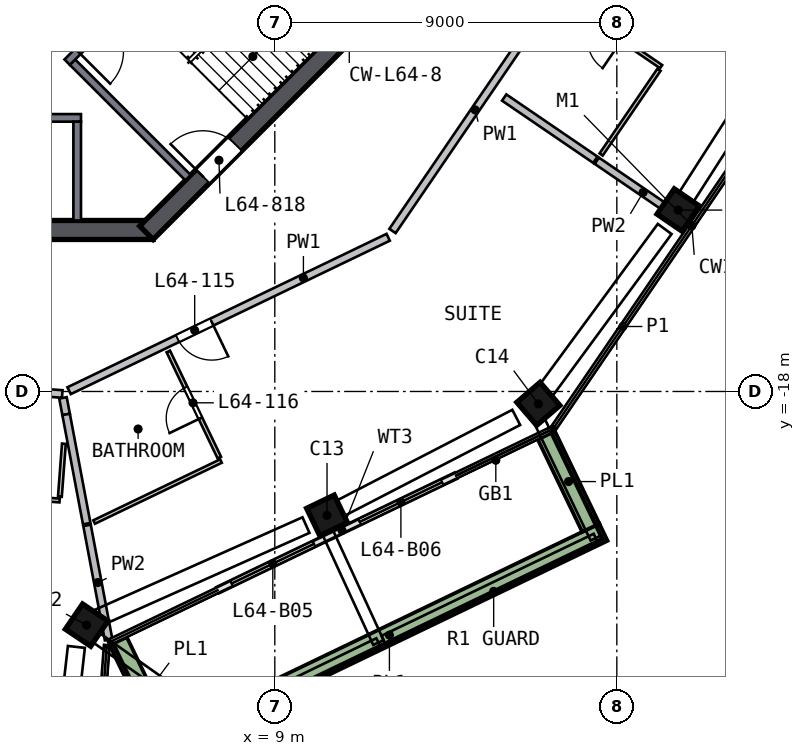
"""IFC4 building model, lengths in metres.
Left out: names, types, materials, properties, quantities, classifications, styles, units other than length and angle.
Written with IfcOpenShell. Run it as: python <this file> out.ifc"""

import sys

from ifc_helpers import new_model, si_unit, direction, frame, frame_2d, origin, origin_2d, place, context, subcontext, project, spatial, rectangle, extrude, element, fill, save


model = new_model("IFC4")
c1 = context("Model", 3, precision=1e-05, world=origin(), true_north=direction((0.0, 1.0)))
c2 = subcontext(c1, "Body", "Model", "MODEL_VIEW")
j1 = project(units=[si_unit("LENGTHUNIT", "METRE"), si_unit("PLANEANGLEUNIT", "RADIAN")], contexts=[c1])
p1 = place(None, origin())
s1 = spatial("IfcSite", under=j1, at=p1, CompositionType="ELEMENT")
p2 = place(p1, origin())
s2 = spatial("IfcBuilding", under=s1, at=p2, CompositionType="ELEMENT")
p3 = place(p2, frame((0.0, 0.0, 259.5)))
s3 = spatial("IfcBuildingStorey", under=s2, at=p3, CompositionType="ELEMENT", Elevation=259.5)
p4 = place(p3, frame((3.91, -24.171, 0.0), z_axis=(0.114774159, 0.019479276, 0.993200609), x_axis=(-0.55689455, -0.826666373, 0.080567778)))
e1 = element("IfcColumn", 1, at=p4, inside=s3, PredefinedType="COLUMN", context=c2, shape_type="SweptSolid", body=[
    extrude(rectangle(XDim=0.8, YDim=0.8, at=origin_2d()), origin(), (0.0, 0.0, 1.0), 3.021),
])
p5 = place(p3, frame((10.252, -21.322, 0.0), z_axis=(0.100998536, 0.049569338, 0.993650933), x_axis=(0.895692503, 0.430206945, -0.112502994)))
e2 = element("IfcColumn", 2, at=p5, inside=s3, PredefinedType="COLUMN", context=c2, shape_type="SweptSolid", body=[
    extrude(rectangle(XDim=0.8, YDim=0.8, at=origin_2d()), origin(), (0.0, 0.0, 1.0), 3.019),
])
p6 = place(p3, frame((15.83, -18.417, 0.0), z_axis=(0.086979121, 0.075985477, 0.993308029), x_axis=(-0.75357881, -0.647132727, 0.115491175)))
e3 = element("IfcColumn", 3, at=p6, inside=s3, PredefinedType="COLUMN", context=c2, shape_type="SweptSolid", body=[
    extrude(rectangle(XDim=0.8, YDim=0.8, at=origin_2d()), origin(), (0.0, 0.0, 1.0), 3.02),
])
p7 = place(p3, frame((19.54, -13.339, 0.0), z_axis=(0.062668984, 0.093477865, 0.993647064), x_axis=(0.560299936, 0.820609145, -0.11253716)))
e4 = element("IfcColumn", 4, at=p7, inside=s3, PredefinedType="COLUMN", context=c2, shape_type="SweptSolid", body=[
    extrude(rectangle(XDim=0.8, YDim=0.8, at=origin_2d()), origin(), (0.0, 0.0, 1.0), 3.019),
])
p8 = place(p3, frame((-5.799, -13.75, 0.0), z_axis=(0.0, 0.0, 1.0), x_axis=(1.0, 0.0, 0.0)))
e5 = element("IfcWall", 5, at=p8, inside=s3, PredefinedType="SHEAR", context=c2, shape_type="SweptSolid", body=[
    extrude(rectangle(XDim=11.598, YDim=0.5, at=frame_2d((5.799, 0.0))), origin(), (0.0, 0.0, 1.0), 3.5),
])
p9 = place(p3, frame((5.622, -13.823, 0.0), z_axis=(0.0, 0.0, 1.0), x_axis=(0.707106781, 0.707106781, 0.0)))
e6 = element("IfcWall", 6, at=p9, inside=s3, PredefinedType="SHEAR", context=c2, shape_type="SweptSolid", body=[
    extrude(rectangle(XDim=11.598, YDim=0.5, at=frame_2d((5.799, 0.0))), origin(), (0.0, 0.0, 1.0), 3.5),
])
p10 = place(p9, frame((2.099, 0.0, 0.0)))
e7 = element("IfcOpeningElement", 7, at=p10, cuts=e6, PredefinedType="OPENING", context=c2, shape_type="SweptSolid", body=[
    extrude(rectangle(XDim=1.2, YDim=2.1, at=frame_2d((0.6, 1.05))), frame((0.0, 0.26, 0.0), z_axis=(0.0, -1.0, 0.0), x_axis=(1.0, 0.0, 0.0)), (0.0, 0.0, 1.0), 0.52),
])
p11 = place(p3, frame((7.506, -23.225, 0.0), z_axis=(0.0, 0.0, 1.0), x_axis=(0.901215754, 0.433370702, 0.0)))
e8 = element("IfcWall", 8, at=p11, inside=s3, PredefinedType="SOLIDWALL", context=c2, shape_type="SweptSolid", body=[
    extrude(rectangle(XDim=3.3, YDim=0.15, at=frame_2d((1.65, 0.0))), origin(), (0.0, 0.0, 1.0), 2.935),
])
p12 = place(p11, frame((0.4, 0.0, 0.0)))
e9 = element("IfcOpeningElement", 9, at=p12, cuts=e8, PredefinedType="OPENING", context=c2, shape_type="SweptSolid", body=[
    extrude(rectangle(XDim=2.4, YDim=2.4, at=frame_2d((1.2, 1.2))), frame((0.0, 0.085, 0.0), z_axis=(0.0, -1.0, 0.0), x_axis=(1.0, 0.0, 0.0)), (0.0, 0.0, 1.0), 0.17),
])
p13 = place(p3, frame((10.48, -21.795, 0.0), z_axis=(0.0, 0.0, 1.0), x_axis=(0.90124235, 0.43331539, 0.0)))
e10 = element("IfcWall", 10, at=p13, inside=s3, PredefinedType="SOLIDWALL", context=c2, shape_type="SweptSolid", body=[
    extrude(rectangle(XDim=3.64, YDim=0.15, at=frame_2d((1.82, 0.0))), origin(), (0.0, 0.0, 1.0), 2.935),
])
p14 = place(p13, frame((0.84, 0.0, 0.0)))
e11 = element("IfcOpeningElement", 11, at=p14, cuts=e10, PredefinedType="OPENING", context=c2, shape_type="SweptSolid", body=[
    extrude(rectangle(XDim=2.4, YDim=2.4, at=frame_2d((1.2, 1.2))), frame((0.0, 0.085, 0.0), z_axis=(0.0, -1.0, 0.0), x_axis=(1.0, 0.0, 0.0)), (0.0, 0.0, 1.0), 0.17),
])
p15 = place(p3, frame((4.88, -24.572, 0.0), z_axis=(0.0, 0.0, 1.0), x_axis=(0.433393374, -0.901204851, 0.0)))
e12 = element("IfcWall", 12, at=p15, inside=s3, PredefinedType="SOLIDWALL", context=c2, shape_type="SweptSolid", body=[
    extrude(rectangle(XDim=3.199, YDim=0.5, at=frame_2d((1.6, 0.0))), origin(), (0.0, 0.0, 1.0), 0.7),
])
p16 = place(p3, frame((6.383, -27.121, 0.0), z_axis=(0.0, 0.0, 1.0), x_axis=(0.901222941, 0.433355755, 0.0)))
e13 = element("IfcWall", 13, at=p16, inside=s3, PredefinedType="SOLIDWALL", context=c2, shape_type="SweptSolid", body=[
    extrude(rectangle(XDim=12.5, YDim=0.5, at=frame_2d((6.25, 0.0))), origin(), (0.0, 0.0, 1.0), 0.7),
])
p17 = place(p3, frame((17.315, -21.587, 0.0), z_axis=(0.0, 0.0, 1.0), x_axis=(-0.433374971, 0.901213701, 0.0)))
e14 = element("IfcWall", 14, at=p17, inside=s3, PredefinedType="SOLIDWALL", context=c2, shape_type="SweptSolid", body=[
    extrude(rectangle(XDim=2.699, YDim=0.5, at=frame_2d((1.35, 0.0))), origin(), (0.0, 0.0, 1.0), 0.7),
])
p18 = place(p3, frame((-3.9, -10.8, 0.0), z_axis=(0.0, 0.0, 1.0), x_axis=(1.0, 0.0, 0.0)))
e15 = element("IfcWall", 15, at=p18, inside=s3, PredefinedType="SOLIDWALL", context=c2, shape_type="SweptSolid", body=[
    extrude(rectangle(XDim=7.8, YDim=0.2, at=frame_2d((3.9, 0.0))), origin(), (0.0, 0.0, 1.0), 3.0),
])
p19 = place(p18, frame((3.45, 0.0, 0.0)))
e16 = element("IfcOpeningElement", 16, at=p19, cuts=e15, PredefinedType="OPENING", context=c2, shape_type="SweptSolid", body=[
    extrude(rectangle(XDim=0.9, YDim=2.1, at=frame_2d((0.45, 1.05))), frame((0.0, 0.11, 0.0), z_axis=(0.0, -1.0, 0.0), x_axis=(1.0, 0.0, 0.0)), (0.0, 0.0, 1.0), 0.22),
])
p20 = place(p3, frame((3.8, -10.9, 0.0), z_axis=(0.0, 0.0, 1.0), x_axis=(0.0, -1.0, 0.0)))
e17 = element("IfcWall", 17, at=p20, inside=s3, PredefinedType="SOLIDWALL", context=c2, shape_type="SweptSolid", body=[
    extrude(rectangle(XDim=2.6, YDim=0.2, at=frame_2d((1.3, 0.0))), origin(), (0.0, 0.0, 1.0), 3.0),
])
p21 = place(p3, frame((9.629, -3.24, 0.0), z_axis=(0.0, 0.0, 1.0), x_axis=(-0.707120946, -0.707092617, 0.0)))
e18 = element("IfcWall", 18, at=p21, inside=s3, PredefinedType="SOLIDWALL", context=c2, shape_type="SweptSolid", body=[
    extrude(rectangle(XDim=8.618, YDim=0.2, at=frame_2d((4.309, 0.0))), origin(), (0.0, 0.0, 1.0), 3.0),
])
p22 = place(p21, frame((7.018, 0.0, 0.0)))
e19 = element("IfcOpeningElement", 19, at=p22, cuts=e18, PredefinedType="OPENING", context=c2, shape_type="SweptSolid", body=[
    extrude(rectangle(XDim=1.2, YDim=2.1, at=frame_2d((0.6, 1.05))), frame((0.0, 0.11, 0.0), z_axis=(0.0, -1.0, 0.0), x_axis=(1.0, 0.0, 0.0)), (0.0, 0.0, 1.0), 0.22),
])
p23 = place(p3, frame((3.677, -9.334, 0.0), z_axis=(0.0, 0.0, 1.0), x_axis=(0.707078393, -0.707135168, 0.0)))
e20 = element("IfcWall", 20, at=p23, inside=s3, PredefinedType="SOLIDWALL", context=c2, shape_type="SweptSolid", body=[
    extrude(rectangle(XDim=4.3, YDim=0.2, at=frame_2d((2.15, 0.0))), origin(), (0.0, 0.0, 1.0), 3.0),
])
p24 = place(p3, frame((-0.241, -17.791, 0.0), z_axis=(0.0, 0.0, 1.0), x_axis=(0.997157218, -0.075349073, 0.0)))
e21 = element("IfcWall", 21, at=p24, inside=s3, PredefinedType="SOLIDWALL", context=c2, shape_type="SweptSolid", body=[
    extrude(rectangle(XDim=3.658, YDim=0.2, at=frame_2d((1.829, 0.0))), origin(), (0.0, 0.0, 1.0), 3.0),
])
p25 = place(p3, frame((11.983, -13.942, 0.0), z_axis=(0.0, 0.0, 1.0), x_axis=(-0.901228413, -0.433344375, 0.0)))
e22 = element("IfcWall", 22, at=p25, inside=s3, PredefinedType="SOLIDWALL", context=c2, shape_type="SweptSolid", body=[
    extrude(rectangle(XDim=9.316, YDim=0.2, at=frame_2d((4.658, 0.0))), origin(), (0.0, 0.0, 1.0), 3.0),
])
p26 = place(p25, frame((5.15, 0.0, 0.0)))
e23 = element("IfcOpeningElement", 23, at=p26, cuts=e22, PredefinedType="OPENING", context=c2, shape_type="SweptSolid", body=[
    extrude(rectangle(XDim=1.0, YDim=2.1, at=frame_2d((0.5, 1.05))), frame((0.0, 0.11, 0.0), z_axis=(0.0, -1.0, 0.0), x_axis=(1.0, 0.0, 0.0)), (0.0, 0.0, 1.0), 0.22),
])
p27 = place(p3, frame((17.236, -6.248, 0.0), z_axis=(0.0, 0.0, 1.0), x_axis=(-0.563807947, -0.825905926, 0.0)))
e24 = element("IfcWall", 24, at=p27, inside=s3, PredefinedType="SOLIDWALL", context=c2, shape_type="SweptSolid", body=[
    extrude(rectangle(XDim=9.115, YDim=0.2, at=frame_2d((4.558, 0.0))), origin(), (0.0, 0.0, 1.0), 3.0),
])
p28 = place(p27, frame((0.2, 0.0, 0.0)))
e25 = element("IfcOpeningElement", 25, at=p28, cuts=e24, PredefinedType="OPENING", context=c2, shape_type="SweptSolid", body=[
    extrude(rectangle(XDim=1.0, YDim=2.1, at=frame_2d((0.5, 1.05))), frame((0.0, 0.11, 0.0), z_axis=(0.0, -1.0, 0.0), x_axis=(1.0, 0.0, 0.0)), (0.0, 0.0, 1.0), 0.22),
])
p29 = place(p3, frame((3.426, -18.168, 0.0), z_axis=(0.0, 0.0, 1.0), x_axis=(0.185317689, -0.982678663, 0.0)))
e26 = element("IfcWall", 26, at=p29, inside=s3, PredefinedType="SOLIDWALL", context=c2, shape_type="SweptSolid", body=[
    extrude(rectangle(XDim=0.444, YDim=0.2, at=frame_2d((0.222, 0.0))), origin(), (0.0, 0.0, 1.0), 3.0),
])
p30 = place(p3, frame((3.509, -18.604, 0.0), z_axis=(0.0, 0.0, 1.0), x_axis=(0.185331809, -0.982676, 0.0)))
e27 = element("IfcWall", 27, at=p30, inside=s3, PredefinedType="SOLIDWALL", context=c2, shape_type="SweptSolid", body=[
    extrude(rectangle(XDim=2.925, YDim=0.2, at=frame_2d((1.462, 0.0))), origin(), (0.0, 0.0, 1.0), 3.0),
])
p31 = place(p3, frame((4.059, -21.523, 0.0), z_axis=(0.0, 0.0, 1.0), x_axis=(0.185338116, -0.98267481, 0.0)))
e28 = element("IfcWall", 28, at=p31, inside=s3, PredefinedType="SOLIDWALL", context=c2, shape_type="SweptSolid", body=[
    extrude(rectangle(XDim=3.061, YDim=0.2, at=frame_2d((1.531, 0.0))), origin(), (0.0, 0.0, 1.0), 3.0),
])
p32 = place(p3, frame((15.036, -10.265, 0.0), z_axis=(0.0, 0.0, 1.0), x_axis=(0.825923162, -0.563782698, 0.0)))
e29 = element("IfcWall", 29, at=p32, inside=s3, PredefinedType="SOLIDWALL", context=c2, shape_type="SweptSolid", body=[
    extrude(rectangle(XDim=2.905, YDim=0.2, at=frame_2d((1.452, 0.0))), origin(), (0.0, 0.0, 1.0), 3.0),
])
p33 = place(p3, frame((17.473, -11.928, 0.0), z_axis=(0.0, 0.0, 1.0), x_axis=(0.825931536, -0.56377043, 0.0)))
e30 = element("IfcWall", 30, at=p33, inside=s3, PredefinedType="SOLIDWALL", context=c2, shape_type="SweptSolid", body=[
    extrude(rectangle(XDim=2.952, YDim=0.2, at=frame_2d((1.476, 0.0))), origin(), (0.0, 0.0, 1.0), 3.0),
])
p34 = place(p3, frame((-0.252, -20.598, 0.0), z_axis=(0.0, 0.0, 1.0), x_axis=(0.997162392, -0.075280572, 0.0)))
e31 = element("IfcWall", 31, at=p34, inside=s3, PredefinedType="PARTITIONING", context=c2, shape_type="SweptSolid", body=[
    extrude(rectangle(XDim=3.6, YDim=0.1, at=frame_2d((1.8, 0.0))), origin(), (0.0, 0.0, 1.0), 3.0),
])
p35 = place(p34, frame((1.2, 0.0, 0.0)))
e32 = element("IfcOpeningElement", 32, at=p35, cuts=e31, PredefinedType="OPENING", context=c2, shape_type="SweptSolid", body=[
    extrude(rectangle(XDim=1.0, YDim=2.1, at=frame_2d((0.5, 1.05))), frame((0.0, 0.06, 0.0), z_axis=(0.0, -1.0, 0.0), x_axis=(1.0, 0.0, 0.0)), (0.0, 0.0, 1.0), 0.12),
])
p36 = place(p3, frame((3.45, -19.375, 0.0), z_axis=(0.0, 0.0, 1.0), x_axis=(-0.075414876, -0.997152243, 0.0)))
e33 = element("IfcWall", 33, at=p36, inside=s3, PredefinedType="PARTITIONING", context=c2, shape_type="SweptSolid", body=[
    extrude(rectangle(XDim=1.398, YDim=0.1, at=frame_2d((0.699, 0.0))), origin(), (0.0, 0.0, 1.0), 3.0),
])
p37 = place(p3, frame((7.584, -19.83, 0.0), z_axis=(0.0, 0.0, 1.0), x_axis=(-0.901215297, -0.433371651, 0.0)))
e34 = element("IfcWall", 34, at=p37, inside=s3, PredefinedType="PARTITIONING", context=c2, shape_type="SweptSolid", body=[
    extrude(rectangle(XDim=3.704, YDim=0.1, at=frame_2d((1.852, 0.0))), origin(), (0.0, 0.0, 1.0), 3.0),
])
p38 = place(p3, frame((7.541, -19.74, 0.0), z_axis=(0.0, 0.0, 1.0), x_axis=(-0.433394078, 0.901204512, 0.0)))
e35 = element("IfcWall", 35, at=p38, inside=s3, PredefinedType="PARTITIONING", context=c2, shape_type="SweptSolid", body=[
    extrude(rectangle(XDim=3.1, YDim=0.1, at=frame_2d((1.55, 0.0))), origin(), (0.0, 0.0, 1.0), 3.0),
])
p39 = place(p38, frame((1.15, 0.0, 0.0)))
e36 = element("IfcOpeningElement", 36, at=p39, cuts=e35, PredefinedType="OPENING", context=c2, shape_type="SweptSolid", body=[
    extrude(rectangle(XDim=0.9, YDim=2.1, at=frame_2d((0.45, 1.05))), frame((0.0, 0.06, 0.0), z_axis=(0.0, -1.0, 0.0), x_axis=(1.0, 0.0, 0.0)), (0.0, 0.0, 1.0), 0.12),
])
p40 = place(p3, frame((19.166, -9.452, 0.0), z_axis=(0.0, 0.0, 1.0), x_axis=(-0.8258963, 0.563822047, 0.0)))
e37 = element("IfcWall", 37, at=p40, inside=s3, PredefinedType="PARTITIONING", context=c2, shape_type="SweptSolid", body=[
    extrude(rectangle(XDim=3.2, YDim=0.1, at=frame_2d((1.6, 0.0))), origin(), (0.0, 0.0, 1.0), 3.0),
])
p41 = place(p40, frame((1.25, 0.0, 0.0)))
e38 = element("IfcOpeningElement", 38, at=p41, cuts=e37, PredefinedType="OPENING", context=c2, shape_type="SweptSolid", body=[
    extrude(rectangle(XDim=0.9, YDim=2.1, at=frame_2d((0.45, 1.05))), frame((0.0, 0.06, 0.0), z_axis=(0.0, -1.0, 0.0), x_axis=(1.0, 0.0, 0.0)), (0.0, 0.0, 1.0), 0.12),
])
p42 = place(p3, frame((19.11, -9.534, 0.0), z_axis=(0.0, 0.0, 1.0), x_axis=(-0.563847343, -0.825879031, 0.0)))
e39 = element("IfcWall", 39, at=p42, inside=s3, PredefinedType="PARTITIONING", context=c2, shape_type="SweptSolid", body=[
    extrude(rectangle(XDim=2.7, YDim=0.1, at=frame_2d((1.35, 0.0))), origin(), (0.0, 0.0, 1.0), 3.0),
])
p43 = place(p12, origin())
e40 = element("IfcDoor", 40, at=p43, inside=s3, OperationType="SLIDING_TO_RIGHT", PredefinedType="DOOR", context=c2, shape_type="SweptSolid", body=[
    extrude(rectangle(XDim=2.4, YDim=2.4, at=frame_2d((1.2, 1.2))), frame((0.0, 0.025, 0.0), z_axis=(0.0, -1.0, 0.0), x_axis=(1.0, 0.0, 0.0)), (0.0, 0.0, 1.0), 0.05),
])
fill(e9, e40)
p44 = place(p14, origin())
e41 = element("IfcDoor", 41, at=p44, inside=s3, OperationType="SLIDING_TO_LEFT", PredefinedType="DOOR", context=c2, shape_type="SweptSolid", body=[
    extrude(rectangle(XDim=2.4, YDim=2.4, at=frame_2d((1.2, 1.2))), frame((0.0, 0.025, 0.0), z_axis=(0.0, -1.0, 0.0), x_axis=(1.0, 0.0, 0.0)), (0.0, 0.0, 1.0), 0.05),
])
fill(e11, e41)
p45 = place(p10, origin())
e42 = element("IfcDoor", 42, at=p45, inside=s3, OperationType="SINGLE_SWING_LEFT", PredefinedType="DOOR", context=c2, shape_type="SweptSolid", body=[
    extrude(rectangle(XDim=1.2, YDim=2.1, at=frame_2d((0.6, 1.05))), frame((0.0, 0.025, 0.0), z_axis=(0.0, -1.0, 0.0), x_axis=(1.0, 0.0, 0.0)), (0.0, 0.0, 1.0), 0.05),
])
fill(e7, e42)
p46 = place(p26, origin())
e43 = element("IfcDoor", 43, at=p46, inside=s3, OperationType="SINGLE_SWING_LEFT", PredefinedType="DOOR", context=c2, shape_type="SweptSolid", body=[
    extrude(rectangle(XDim=1.0, YDim=2.1, at=frame_2d((0.5, 1.05))), frame((0.0, 0.025, 0.0), z_axis=(0.0, -1.0, 0.0), x_axis=(1.0, 0.0, 0.0)), (0.0, 0.0, 1.0), 0.05),
])
fill(e23, e43)
p47 = place(p39, origin())
e44 = element("IfcDoor", 44, at=p47, inside=s3, OperationType="SINGLE_SWING_LEFT", PredefinedType="DOOR", context=c2, shape_type="SweptSolid", body=[
    extrude(rectangle(XDim=0.9, YDim=2.1, at=frame_2d((0.45, 1.05))), frame((0.0, 0.025, 0.0), z_axis=(0.0, -1.0, 0.0), x_axis=(1.0, 0.0, 0.0)), (0.0, 0.0, 1.0), 0.05),
])
fill(e36, e44)
save(model, sys.argv[1])
